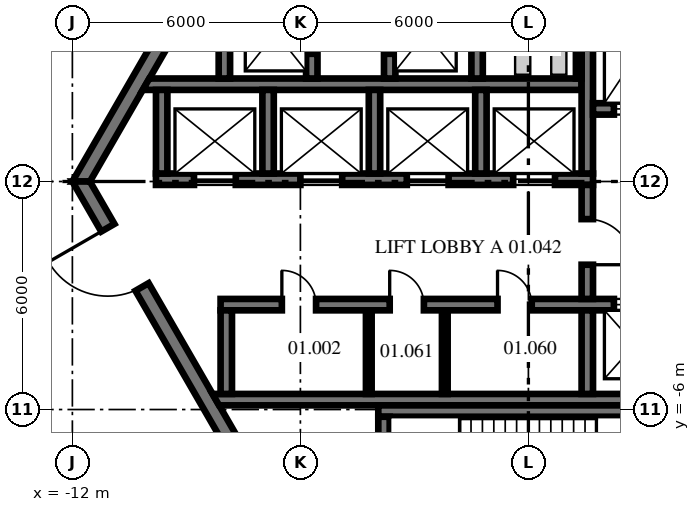
"""IFC4 building model, lengths in metres.
Left out: names, types, materials, properties, quantities, classifications, styles, units other than length and angle.
Written with IfcOpenShell. Run it as: python <this file> out.ifc"""

import sys

from ifc_helpers import new_model, si_unit, direction, frame, frame_2d, origin, place, context, subcontext, project, spatial, polyline, rectangle, outline, extrude, source, transform, mapped, element, fill, save


model = new_model("IFC4")
c1 = context("Model", 3, precision=1e-05, world=origin(), true_north=direction((0.0, 1.0)))
c2 = subcontext(c1, "Body", "Model", "MODEL_VIEW")
j1 = project(units=[si_unit("LENGTHUNIT", "METRE"), si_unit("PLANEANGLEUNIT", "RADIAN")], contexts=[c1])
p1 = place(None, origin())
s1 = spatial("IfcSite", under=j1, at=p1, CompositionType="ELEMENT")
p2 = place(p1, origin())
s2 = spatial("IfcBuilding", under=s1, at=p2, CompositionType="ELEMENT")
p3 = place(p2, frame((0.0, 0.0, 7.0)))
s3 = spatial("IfcBuildingStorey", under=s2, at=p3, CompositionType="ELEMENT", Elevation=7.0)
m1 = source(origin(), c2, "Body", "SweptSolid", [
    extrude(outline(polyline([(-0.115, -0.2), (11.885, -0.2), (11.654, 0.2), (0.115, 0.2), (-0.115, -0.2)])), origin(), (0.0, 0.0, 1.0), 4.3),
])
p4 = place(p3, frame((-5.885, 10.192, 0.0), z_axis=(0.0, 0.0, 1.0), x_axis=(-0.499996592174, -0.866027371285, 0.0)))
e1 = element("IfcWall", 1, at=p4, inside=s3, PredefinedType="SHEAR", context=c2, shape_type="MappedRepresentation", body=[
    mapped(m1, transform((0.0, 0.0, 0.0), scale=1.0)),
])
p5 = place(p4, frame((3.185, 0.0, 0.0)))
e2 = element("IfcOpeningElement", 2, at=p5, cuts=e1, PredefinedType="OPENING", context=c2, shape_type="SweptSolid", body=[
    extrude(rectangle(XDim=1.2, YDim=2.1, at=frame_2d((0.6, 1.05))), frame((0.0, 0.21, 0.0), z_axis=(0.0, -1.0, 0.0), x_axis=(1.0, 0.0, 0.0)), (0.0, 0.0, 1.0), 0.42),
])
p6 = place(p3, frame((-11.769, 0.0, 0.0), z_axis=(0.0, 0.0, 1.0), x_axis=(0.499996592174, -0.866027371285, 0.0)))
e3 = element("IfcWall", 3, at=p6, inside=s3, PredefinedType="SHEAR", context=c2, shape_type="MappedRepresentation", body=[
    mapped(m1, transform((0.0, 0.0, 0.0), scale=1.0)),
])
p7 = place(p6, frame((1.405, 0.0, 0.0)))
e4 = element("IfcOpeningElement", 4, at=p7, cuts=e3, PredefinedType="OPENING", context=c2, shape_type="SweptSolid", body=[
    extrude(rectangle(XDim=1.8, YDim=2.1, at=frame_2d((0.9, 1.05))), frame((0.0, 0.21, 0.0), z_axis=(0.0, -1.0, 0.0), x_axis=(1.0, 0.0, 0.0)), (0.0, 0.0, 1.0), 0.42),
])
p8 = place(p6, frame((7.915, 0.0, 0.0)))
e5 = element("IfcOpeningElement", 5, at=p8, cuts=e3, PredefinedType="OPENING", context=c2, shape_type="SweptSolid", body=[
    extrude(rectangle(XDim=1.2, YDim=2.1, at=frame_2d((0.6, 1.05))), frame((0.0, 0.21, 0.0), z_axis=(0.0, -1.0, 0.0), x_axis=(1.0, 0.0, 0.0)), (0.0, 0.0, 1.0), 0.42),
])
m2 = source(origin(), c2, "Body", "SweptSolid", [
    extrude(rectangle(XDim=11.5, YDim=0.3, at=frame_2d((5.75, 0.0))), origin(), (0.0, 0.0, 1.0), 4.3),
])
p9 = place(p3, frame((-9.8, 0.06, 0.0), z_axis=(0.0, 0.0, 1.0), x_axis=(1.0, 0.0, 0.0)))
e6 = element("IfcWall", 6, at=p9, inside=s3, PredefinedType="SHEAR", context=c2, shape_type="MappedRepresentation", body=[
    mapped(m2, transform((0.0, 0.0, 0.0), scale=1.0)),
])
p10 = place(p9, frame((1.0, 0.0, 0.0)))
e7 = element("IfcOpeningElement", 7, at=p10, cuts=e6, PredefinedType="OPENING", context=c2, shape_type="SweptSolid", body=[
    extrude(rectangle(XDim=1.1, YDim=2.1, at=frame_2d((0.55, 1.05))), frame((0.0, 0.16, 0.0), z_axis=(0.0, -1.0, 0.0), x_axis=(1.0, 0.0, 0.0)), (0.0, 0.0, 1.0), 0.32),
])
p11 = place(p9, frame((3.8, 0.0, 0.0)))
e8 = element("IfcOpeningElement", 8, at=p11, cuts=e6, PredefinedType="OPENING", context=c2, shape_type="SweptSolid", body=[
    extrude(rectangle(XDim=1.1, YDim=2.1, at=frame_2d((0.55, 1.05))), frame((0.0, 0.16, 0.0), z_axis=(0.0, -1.0, 0.0), x_axis=(1.0, 0.0, 0.0)), (0.0, 0.0, 1.0), 0.32),
])
p12 = place(p9, frame((6.6, 0.0, 0.0)))
e9 = element("IfcOpeningElement", 9, at=p12, cuts=e6, PredefinedType="OPENING", context=c2, shape_type="SweptSolid", body=[
    extrude(rectangle(XDim=1.1, YDim=2.1, at=frame_2d((0.55, 1.05))), frame((0.0, 0.16, 0.0), z_axis=(0.0, -1.0, 0.0), x_axis=(1.0, 0.0, 0.0)), (0.0, 0.0, 1.0), 0.32),
])
p13 = place(p9, frame((9.4, 0.0, 0.0)))
e10 = element("IfcOpeningElement", 10, at=p13, cuts=e6, PredefinedType="OPENING", context=c2, shape_type="SweptSolid", body=[
    extrude(rectangle(XDim=1.1, YDim=2.1, at=frame_2d((0.55, 1.05))), frame((0.0, 0.16, 0.0), z_axis=(0.0, -1.0, 0.0), x_axis=(1.0, 0.0, 0.0)), (0.0, 0.0, 1.0), 0.32),
])
m3 = source(origin(), c2, "Body", "SweptSolid", [
    extrude(outline(polyline([(11.2, -0.15), (-0.349, -0.15), (-0.176, 0.15), (11.2, 0.15), (11.2, -0.15)])), origin(), (0.0, 0.0, 1.0), 4.3),
])
p14 = place(p3, frame((-9.8, 2.56, 0.0), z_axis=(0.0, 0.0, 1.0), x_axis=(1.0, 0.0, 0.0)))
e11 = element("IfcWall", 11, at=p14, inside=s3, PredefinedType="SHEAR", context=c2, shape_type="MappedRepresentation", body=[
    mapped(m3, transform((0.0, 0.0, 0.0), scale=1.0)),
])
m4 = source(origin(), c2, "Body", "SweptSolid", [
    extrude(rectangle(XDim=4.45, YDim=0.3, at=frame_2d((2.225, 0.0))), origin(), (0.0, 0.0, 1.0), 4.3),
])
p15 = place(p3, frame((1.55, 0.21, 0.0), z_axis=(0.0, 0.0, 1.0), x_axis=(0.0, 1.0, 0.0)))
e12 = element("IfcWall", 12, at=p15, inside=s3, PredefinedType="SHEAR", context=c2, shape_type="MappedRepresentation", body=[
    mapped(m4, transform((0.0, 0.0, 0.0), scale=1.0)),
])
m5 = source(origin(), c2, "Body", "SweptSolid", [
    extrude(rectangle(XDim=3.0, YDim=0.3, at=frame_2d((1.5, 0.0))), origin(), (0.0, 0.0, 1.0), 4.3),
])
p16 = place(p3, frame((1.7, 1.91, 0.0), z_axis=(0.0, 0.0, 1.0), x_axis=(1.0, 0.0, 0.0)))
e13 = element("IfcWall", 13, at=p16, inside=s3, PredefinedType="SHEAR", context=c2, shape_type="MappedRepresentation", body=[
    mapped(m5, transform((0.0, 0.0, 0.0), scale=1.0)),
])
p17 = place(p16, frame((0.55, 0.0, 0.0)))
e14 = element("IfcOpeningElement", 14, at=p17, cuts=e13, PredefinedType="OPENING", context=c2, shape_type="SweptSolid", body=[
    extrude(rectangle(XDim=1.1, YDim=2.1, at=frame_2d((0.55, 1.05))), frame((0.0, 0.16, 0.0), z_axis=(0.0, -1.0, 0.0), x_axis=(1.0, 0.0, 0.0)), (0.0, 0.0, 1.0), 0.32),
])
m6 = source(origin(), c2, "Body", "SweptSolid", [
    extrude(rectangle(XDim=12.8, YDim=0.3, at=frame_2d((6.4, 0.0))), origin(), (0.0, 0.0, 1.0), 4.3),
])
p18 = place(p3, frame((-8.1, -3.24, 0.0), z_axis=(0.0, 0.0, 1.0), x_axis=(1.0, 0.0, 0.0)))
e15 = element("IfcWall", 15, at=p18, inside=s3, PredefinedType="SHEAR", context=c2, shape_type="MappedRepresentation", body=[
    mapped(m6, transform((0.0, 0.0, 0.0), scale=1.0)),
])
p19 = place(p18, frame((1.613, 0.0, 0.0)))
e16 = element("IfcOpeningElement", 16, at=p19, cuts=e15, PredefinedType="OPENING", context=c2, shape_type="SweptSolid", body=[
    extrude(rectangle(XDim=0.9, YDim=2.1, at=frame_2d((0.45, 1.05))), frame((0.0, 0.16, 0.0), z_axis=(0.0, -1.0, 0.0), x_axis=(1.0, 0.0, 0.0)), (0.0, 0.0, 1.0), 0.32),
])
p20 = place(p18, frame((4.45, 0.0, 0.0)))
e17 = element("IfcOpeningElement", 17, at=p20, cuts=e15, PredefinedType="OPENING", context=c2, shape_type="SweptSolid", body=[
    extrude(rectangle(XDim=0.9, YDim=2.1, at=frame_2d((0.45, 1.05))), frame((0.0, 0.16, 0.0), z_axis=(0.0, -1.0, 0.0), x_axis=(1.0, 0.0, 0.0)), (0.0, 0.0, 1.0), 0.32),
])
p21 = place(p18, frame((7.288, 0.0, 0.0)))
e18 = element("IfcOpeningElement", 18, at=p21, cuts=e15, PredefinedType="OPENING", context=c2, shape_type="SweptSolid", body=[
    extrude(rectangle(XDim=0.9, YDim=2.1, at=frame_2d((0.45, 1.05))), frame((0.0, 0.16, 0.0), z_axis=(0.0, -1.0, 0.0), x_axis=(1.0, 0.0, 0.0)), (0.0, 0.0, 1.0), 0.32),
])
p22 = place(p18, frame((10.35, 0.0, 0.0)))
e19 = element("IfcOpeningElement", 19, at=p22, cuts=e15, PredefinedType="OPENING", context=c2, shape_type="SweptSolid", body=[
    extrude(rectangle(XDim=1.1, YDim=2.1, at=frame_2d((0.55, 1.05))), frame((0.0, 0.16, 0.0), z_axis=(0.0, -1.0, 0.0), x_axis=(1.0, 0.0, 0.0)), (0.0, 0.0, 1.0), 0.32),
])
m7 = source(origin(), c2, "Body", "SweptSolid", [
    extrude(outline(polyline([(12.0, -0.15), (-0.04, -0.15), (-0.213, 0.15), (12.0, 0.15), (12.0, -0.15)])), origin(), (0.0, 0.0, 1.0), 4.3),
])
p23 = place(p3, frame((-8.1, -5.74, 0.0), z_axis=(0.0, 0.0, 1.0), x_axis=(1.0, 0.0, 0.0)))
e20 = element("IfcWall", 20, at=p23, inside=s3, PredefinedType="SHEAR", context=c2, shape_type="MappedRepresentation", body=[
    mapped(m7, transform((0.0, 0.0, 0.0), scale=1.0)),
])
m8 = source(origin(), c2, "Body", "SweptSolid", [
    extrude(rectangle(XDim=2.2, YDim=0.3, at=frame_2d((1.1, 0.0))), origin(), (0.0, 0.0, 1.0), 4.3),
])
p24 = place(p3, frame((-7.95, -5.59, 0.0), z_axis=(0.0, 0.0, 1.0), x_axis=(0.0, 1.0, 0.0)))
e21 = element("IfcWall", 21, at=p24, inside=s3, PredefinedType="SHEAR", context=c2, shape_type="MappedRepresentation", body=[
    mapped(m8, transform((0.0, 0.0, 0.0), scale=1.0)),
])
m9 = source(origin(), c2, "Body", "SweptSolid", [
    extrude(rectangle(XDim=2.2, YDim=0.3, at=frame_2d((1.1, 0.0))), origin(), (0.0, 0.0, 1.0), 4.3),
])
p25 = place(p3, frame((-9.65, 0.21, 0.0), z_axis=(0.0, 0.0, 1.0), x_axis=(0.0, 1.0, 0.0)))
e22 = element("IfcWall", 22, at=p25, inside=s3, PredefinedType="SHEAR", context=c2, shape_type="MappedRepresentation", body=[
    mapped(m9, transform((0.0, 0.0, 0.0), scale=1.0)),
])
p26 = place(p3, frame((1.55, -5.59, 0.0), z_axis=(0.0, 0.0, 1.0), x_axis=(0.0, 1.0, 0.0)))
e23 = element("IfcWall", 23, at=p26, inside=s3, PredefinedType="SHEAR", context=c2, shape_type="MappedRepresentation", body=[
    mapped(m8, transform((0.0, 0.0, 0.0), scale=1.0)),
])
p27 = place(p3, frame((1.55, -3.09, 0.0), z_axis=(0.0, 0.0, 1.0), x_axis=(0.0, 1.0, 0.0)))
e24 = element("IfcWall", 24, at=p27, inside=s3, PredefinedType="SHEAR", context=c2, shape_type="MappedRepresentation", body=[
    mapped(m5, transform((0.0, 0.0, 0.0), scale=1.0)),
])
p28 = place(p27, frame((0.9, 0.0, 0.0)))
e25 = element("IfcOpeningElement", 25, at=p28, cuts=e24, PredefinedType="OPENING", context=c2, shape_type="SweptSolid", body=[
    extrude(rectangle(XDim=1.2, YDim=2.1, at=frame_2d((0.6, 1.05))), frame((0.0, 0.16, 0.0), z_axis=(0.0, -1.0, 0.0), x_axis=(1.0, 0.0, 0.0)), (0.0, 0.0, 1.0), 0.32),
])
m10 = source(origin(), c2, "Body", "SweptSolid", [
    extrude(outline(polyline([(0.0, -0.15), (8.95, -0.15), (8.65, 0.15), (0.0, 0.15), (0.0, -0.15)])), origin(), (0.0, 0.0, 1.0), 4.3),
])
p29 = place(p3, frame((-3.95, -6.04, 0.0), z_axis=(0.0, 0.0, 1.0), x_axis=(1.0, 0.0, 0.0)))
e26 = element("IfcWall", 26, at=p29, inside=s3, PredefinedType="SHEAR", context=c2, shape_type="MappedRepresentation", body=[
    mapped(m10, transform((0.0, 0.0, 0.0), scale=1.0)),
])
m11 = source(origin(), c2, "Body", "SweptSolid", [
    extrude(outline(polyline([(3.8, -0.15), (-0.004, -0.15), (-0.004, 0.15), (3.8, 0.15), (3.8, -0.15)])), origin(), (0.0, 0.0, 1.0), 4.3),
])
p30 = place(p3, frame((-3.8, -9.99, 0.0), z_axis=(0.0, 0.0, 1.0), x_axis=(0.0, 1.0, 0.0)))
e27 = element("IfcWall", 27, at=p30, inside=s3, PredefinedType="SHEAR", context=c2, shape_type="MappedRepresentation", body=[
    mapped(m11, transform((0.0, 0.0, 0.0), scale=1.0)),
])
m12 = source(origin(), c2, "Body", "SweptSolid", [
    extrude(rectangle(XDim=2.4, YDim=0.3, at=frame_2d((1.2, 0.0))), origin(), (0.0, 0.0, 1.0), 4.3),
])
p31 = place(p3, frame((-8.0, 2.71, 0.0), z_axis=(0.0, 0.0, 1.0), x_axis=(0.0, 1.0, 0.0)))
e28 = element("IfcWall", 28, at=p31, inside=s3, PredefinedType="SHEAR", context=c2, shape_type="MappedRepresentation", body=[
    mapped(m12, transform((0.0, 0.0, 0.0), scale=1.0)),
])
p32 = place(p3, frame((-5.7, 2.71, 0.0), z_axis=(0.0, 0.0, 1.0), x_axis=(0.0, 1.0, 0.0)))
e29 = element("IfcWall", 29, at=p32, inside=s3, PredefinedType="SHEAR", context=c2, shape_type="MappedRepresentation", body=[
    mapped(m12, transform((0.0, 0.0, 0.0), scale=1.0)),
])
p33 = place(p32, frame((0.65, 0.0, 0.0)))
e30 = element("IfcOpeningElement", 30, at=p33, cuts=e29, PredefinedType="OPENING", context=c2, shape_type="SweptSolid", body=[
    extrude(rectangle(XDim=1.1, YDim=2.1, at=frame_2d((0.55, 1.05))), frame((0.0, 0.16, 0.0), z_axis=(0.0, -1.0, 0.0), x_axis=(1.0, 0.0, 0.0)), (0.0, 0.0, 1.0), 0.32),
])
p34 = place(p3, frame((-3.65, 2.71, 0.0), z_axis=(0.0, 0.0, 1.0), x_axis=(0.0, 1.0, 0.0)))
e31 = element("IfcWall", 31, at=p34, inside=s3, PredefinedType="SHEAR", context=c2, shape_type="MappedRepresentation", body=[
    mapped(m12, transform((0.0, 0.0, 0.0), scale=1.0)),
])
p35 = place(p34, frame((0.65, 0.0, 0.0)))
e32 = element("IfcOpeningElement", 32, at=p35, cuts=e31, PredefinedType="OPENING", context=c2, shape_type="SweptSolid", body=[
    extrude(rectangle(XDim=1.1, YDim=2.1, at=frame_2d((0.55, 1.05))), frame((0.0, 0.16, 0.0), z_axis=(0.0, -1.0, 0.0), x_axis=(1.0, 0.0, 0.0)), (0.0, 0.0, 1.0), 0.32),
])
p36 = place(p3, frame((-1.35, 2.71, 0.0), z_axis=(0.0, 0.0, 1.0), x_axis=(0.0, 1.0, 0.0)))
e33 = element("IfcWall", 33, at=p36, inside=s3, PredefinedType="SHEAR", context=c2, shape_type="MappedRepresentation", body=[
    mapped(m12, transform((0.0, 0.0, 0.0), scale=1.0)),
])
m13 = source(origin(), c2, "Body", "SweptSolid", [
    extrude(rectangle(XDim=3.18, YDim=0.15, at=frame_2d((1.59, 0.0))), origin(), (0.0, 0.0, 1.0), 4.3),
])
p37 = place(p3, frame((1.325, 2.71, 0.0), z_axis=(0.0, 0.0, 1.0), x_axis=(0.0, 1.0, 0.0)))
e34 = element("IfcWall", 34, at=p37, inside=s3, PredefinedType="PARTITIONING", context=c2, shape_type="MappedRepresentation", body=[
    mapped(m13, transform((0.0, 0.0, 0.0), scale=1.0)),
])
p38 = place(p37, frame((2.265, 0.0, 0.0)))
e35 = element("IfcOpeningElement", 35, at=p38, cuts=e34, PredefinedType="OPENING", context=c2, shape_type="SweptSolid", body=[
    extrude(rectangle(XDim=0.9, YDim=2.1, at=frame_2d((0.45, 1.05))), frame((0.0, 0.085, 0.0), z_axis=(0.0, -1.0, 0.0), x_axis=(1.0, 0.0, 0.0)), (0.0, 0.0, 1.0), 0.17),
])
for number, where, z_axis, x_axis in (
    (36, (-6.85, 0.21, 0.0), (0.0, 0.0, 1.0), (0.0, 1.0, 0.0)),
    (37, (-4.05, 0.21, 0.0), (0.0, 0.0, 1.0), (0.0, 1.0, 0.0)),
    (38, (-1.25, 0.21, 0.0), (0.0, 0.0, 1.0), (0.0, 1.0, 0.0)),
):
    element("IfcWall", number, at=place(p3, frame(where, z_axis=z_axis, x_axis=x_axis)), inside=s3, PredefinedType="SHEAR", context=c2, shape_type="MappedRepresentation", body=[
        mapped(m9, transform((0.0, 0.0, 0.0), scale=1.0)),
    ])
m14 = source(origin(), c2, "Body", "SweptSolid", [
    extrude(rectangle(XDim=2.2, YDim=0.15, at=frame_2d((1.1, 0.0))), origin(), (0.0, 0.0, 1.0), 4.3),
])
for number, where, z_axis, x_axis in (
    (39, (-4.2, -5.59, 0.0), (0.0, 0.0, 1.0), (0.0, 1.0, 0.0)),
    (40, (-2.2, -5.59, 0.0), (0.0, 0.0, 1.0), (0.0, 1.0, 0.0)),
):
    element("IfcWall", number, at=place(p3, frame(where, z_axis=z_axis, x_axis=x_axis)), inside=s3, PredefinedType="PARTITIONING", context=c2, shape_type="MappedRepresentation", body=[
        mapped(m14, transform((0.0, 0.0, 0.0), scale=1.0)),
    ])
p39 = place(p3, frame((-17.542, 0.0, 0.0), z_axis=(0.0, 0.0, 1.0), x_axis=(0.499996320153, -0.866027528335, 0.0)))
e41 = element("IfcWall", 41, at=p39, inside=s3, PredefinedType="PARTITIONING", context=c2, shape_type="SweptSolid", body=[
    extrude(rectangle(XDim=17.543, YDim=0.15, at=frame_2d((8.771, 0.0))), origin(), (0.0, 0.0, 1.0), 4.3),
])
p40 = place(p39, frame((3.65, 0.0, 0.0)))
e42 = element("IfcOpeningElement", 42, at=p40, cuts=e41, PredefinedType="OPENING", context=c2, shape_type="SweptSolid", body=[
    extrude(rectangle(XDim=0.9, YDim=2.1, at=frame_2d((0.45, 1.05))), frame((0.0, 0.085, 0.0), z_axis=(0.0, -1.0, 0.0), x_axis=(1.0, 0.0, 0.0)), (0.0, 0.0, 1.0), 0.17),
])
p41 = place(p39, frame((12.43, 0.0, 0.0)))
e43 = element("IfcOpeningElement", 43, at=p41, cuts=e41, PredefinedType="OPENING", context=c2, shape_type="SweptSolid", body=[
    extrude(rectangle(XDim=0.9, YDim=2.1, at=frame_2d((0.45, 1.05))), frame((0.0, 0.085, 0.0), z_axis=(0.0, -1.0, 0.0), x_axis=(1.0, 0.0, 0.0)), (0.0, 0.0, 1.0), 0.17),
])
p42 = place(p3, frame((-17.518, 0.044, 0.0), z_axis=(0.0, 0.0, 1.0), x_axis=(0.500011872673, 0.866018548985, 0.0)))
e44 = element("IfcWall", 44, at=p42, inside=s3, PredefinedType="PARTITIONING", context=c2, shape_type="SweptSolid", body=[
    extrude(rectangle(XDim=17.452, YDim=0.15, at=frame_2d((8.726, 0.0))), origin(), (0.0, 0.0, 1.0), 4.3),
])
p43 = place(p42, frame((11.417, 0.0, 0.0)))
e45 = element("IfcOpeningElement", 45, at=p43, cuts=e44, PredefinedType="OPENING", context=c2, shape_type="SweptSolid", body=[
    extrude(rectangle(XDim=1.8, YDim=2.4, at=frame_2d((0.9, 1.2))), frame((0.0, 0.085, 0.0), z_axis=(0.0, -1.0, 0.0), x_axis=(1.0, 0.0, 0.0)), (0.0, 0.0, 1.0), 0.17),
])
p44 = place(p42, frame((2.006, 0.0, 0.0)))
e46 = element("IfcOpeningElement", 46, at=p44, cuts=e44, PredefinedType="OPENING", context=c2, shape_type="SweptSolid", body=[
    extrude(rectangle(XDim=0.9, YDim=2.1, at=frame_2d((0.45, 1.05))), frame((0.0, 0.085, 0.0), z_axis=(0.0, -1.0, 0.0), x_axis=(1.0, 0.0, 0.0)), (0.0, 0.0, 1.0), 0.17),
])
p45 = place(p42, frame((6.108, 0.0, 0.0)))
e47 = element("IfcOpeningElement", 47, at=p45, cuts=e44, PredefinedType="OPENING", context=c2, shape_type="SweptSolid", body=[
    extrude(rectangle(XDim=0.9, YDim=2.1, at=frame_2d((0.45, 1.05))), frame((0.0, 0.085, 0.0), z_axis=(0.0, -1.0, 0.0), x_axis=(1.0, 0.0, 0.0)), (0.0, 0.0, 1.0), 0.17),
])
p46 = place(p7, frame((1.8, 0.0, 0.0), z_axis=(0.0, 0.0, 1.0), x_axis=(-1.0, 0.0, 0.0)))
e48 = element("IfcDoor", 48, at=p46, inside=s3, OperationType="DOUBLE_DOOR_DOUBLE_SWING", PredefinedType="DOOR", context=c2, shape_type="SweptSolid", body=[
    extrude(rectangle(XDim=1.8, YDim=2.1, at=frame_2d((0.9, 1.05))), frame((0.0, 0.025, 0.0), z_axis=(0.0, -1.0, 0.0), x_axis=(1.0, 0.0, 0.0)), (0.0, 0.0, 1.0), 0.05),
])
fill(e4, e48)
p47 = place(p28, frame((1.2, 0.0, 0.0), z_axis=(0.0, 0.0, 1.0), x_axis=(-1.0, 0.0, 0.0)))
e49 = element("IfcDoor", 49, at=p47, inside=s3, OperationType="SINGLE_SWING_RIGHT", PredefinedType="DOOR", context=c2, shape_type="SweptSolid", body=[
    extrude(rectangle(XDim=1.2, YDim=2.1, at=frame_2d((0.6, 1.05))), frame((0.0, 0.025, 0.0), z_axis=(0.0, -1.0, 0.0), x_axis=(1.0, 0.0, 0.0)), (0.0, 0.0, 1.0), 0.05),
])
fill(e25, e49)
p48 = place(p19, origin())
e50 = element("IfcDoor", 50, at=p48, inside=s3, OperationType="SINGLE_SWING_LEFT", PredefinedType="DOOR", context=c2, shape_type="SweptSolid", body=[
    extrude(rectangle(XDim=0.9, YDim=2.1, at=frame_2d((0.45, 1.05))), frame((0.0, 0.025, 0.0), z_axis=(0.0, -1.0, 0.0), x_axis=(1.0, 0.0, 0.0)), (0.0, 0.0, 1.0), 0.05),
])
fill(e16, e50)
p49 = place(p20, origin())
e51 = element("IfcDoor", 51, at=p49, inside=s3, OperationType="SINGLE_SWING_LEFT", PredefinedType="DOOR", context=c2, shape_type="SweptSolid", body=[
    extrude(rectangle(XDim=0.9, YDim=2.1, at=frame_2d((0.45, 1.05))), frame((0.0, 0.025, 0.0), z_axis=(0.0, -1.0, 0.0), x_axis=(1.0, 0.0, 0.0)), (0.0, 0.0, 1.0), 0.05),
])
fill(e17, e51)
p50 = place(p21, origin())
e52 = element("IfcDoor", 52, at=p50, inside=s3, OperationType="SINGLE_SWING_LEFT", PredefinedType="DOOR", context=c2, shape_type="SweptSolid", body=[
    extrude(rectangle(XDim=0.9, YDim=2.1, at=frame_2d((0.45, 1.05))), frame((0.0, 0.025, 0.0), z_axis=(0.0, -1.0, 0.0), x_axis=(1.0, 0.0, 0.0)), (0.0, 0.0, 1.0), 0.05),
])
fill(e18, e52)
p51 = place(p10, origin())
e53 = element("IfcDoor", 53, at=p51, inside=s3, OperationType="DOUBLE_DOOR_SLIDING", PredefinedType="DOOR", context=c2, shape_type="SweptSolid", body=[
    extrude(rectangle(XDim=1.1, YDim=2.1, at=frame_2d((0.55, 1.05))), frame((0.0, 0.025, 0.0), z_axis=(0.0, -1.0, 0.0), x_axis=(1.0, 0.0, 0.0)), (0.0, 0.0, 1.0), 0.05),
])
fill(e7, e53)
p52 = place(p11, origin())
e54 = element("IfcDoor", 54, at=p52, inside=s3, OperationType="DOUBLE_DOOR_SLIDING", PredefinedType="DOOR", context=c2, shape_type="SweptSolid", body=[
    extrude(rectangle(XDim=1.1, YDim=2.1, at=frame_2d((0.55, 1.05))), frame((0.0, 0.025, 0.0), z_axis=(0.0, -1.0, 0.0), x_axis=(1.0, 0.0, 0.0)), (0.0, 0.0, 1.0), 0.05),
])
fill(e8, e54)
p53 = place(p12, origin())
e55 = element("IfcDoor", 55, at=p53, inside=s3, OperationType="DOUBLE_DOOR_SLIDING", PredefinedType="DOOR", context=c2, shape_type="SweptSolid", body=[
    extrude(rectangle(XDim=1.1, YDim=2.1, at=frame_2d((0.55, 1.05))), frame((0.0, 0.025, 0.0), z_axis=(0.0, -1.0, 0.0), x_axis=(1.0, 0.0, 0.0)), (0.0, 0.0, 1.0), 0.05),
])
fill(e9, e55)
p54 = place(p13, origin())
e56 = element("IfcDoor", 56, at=p54, inside=s3, OperationType="DOUBLE_DOOR_SLIDING", PredefinedType="DOOR", context=c2, shape_type="SweptSolid", body=[
    extrude(rectangle(XDim=1.1, YDim=2.1, at=frame_2d((0.55, 1.05))), frame((0.0, 0.025, 0.0), z_axis=(0.0, -1.0, 0.0), x_axis=(1.0, 0.0, 0.0)), (0.0, 0.0, 1.0), 0.05),
])
fill(e10, e56)
p55 = place(p17, origin())
e57 = element("IfcDoor", 57, at=p55, inside=s3, OperationType="DOUBLE_DOOR_SLIDING", PredefinedType="DOOR", context=c2, shape_type="SweptSolid", body=[
    extrude(rectangle(XDim=1.1, YDim=2.1, at=frame_2d((0.55, 1.05))), frame((0.0, 0.025, 0.0), z_axis=(0.0, -1.0, 0.0), x_axis=(1.0, 0.0, 0.0)), (0.0, 0.0, 1.0), 0.05),
])
fill(e14, e57)
p56 = place(p22, origin())
e58 = element("IfcDoor", 58, at=p56, inside=s3, OperationType="DOUBLE_DOOR_SLIDING", PredefinedType="DOOR", context=c2, shape_type="SweptSolid", body=[
    extrude(rectangle(XDim=1.1, YDim=2.1, at=frame_2d((0.55, 1.05))), frame((0.0, 0.025, 0.0), z_axis=(0.0, -1.0, 0.0), x_axis=(1.0, 0.0, 0.0)), (0.0, 0.0, 1.0), 0.05),
])
fill(e19, e58)
p57 = place(p33, origin())
e59 = element("IfcDoor", 59, at=p57, inside=s3, OperationType="DOUBLE_DOOR_SLIDING", PredefinedType="DOOR", context=c2, shape_type="SweptSolid", body=[
    extrude(rectangle(XDim=1.1, YDim=2.1, at=frame_2d((0.55, 1.05))), frame((0.0, 0.025, 0.0), z_axis=(0.0, -1.0, 0.0), x_axis=(1.0, 0.0, 0.0)), (0.0, 0.0, 1.0), 0.05),
])
fill(e30, e59)
p58 = place(p35, origin())
e60 = element("IfcDoor", 60, at=p58, inside=s3, OperationType="DOUBLE_DOOR_SLIDING", PredefinedType="DOOR", context=c2, shape_type="SweptSolid", body=[
    extrude(rectangle(XDim=1.1, YDim=2.1, at=frame_2d((0.55, 1.05))), frame((0.0, 0.025, 0.0), z_axis=(0.0, -1.0, 0.0), x_axis=(1.0, 0.0, 0.0)), (0.0, 0.0, 1.0), 0.05),
])
fill(e32, e60)
save(model, sys.argv[1])
